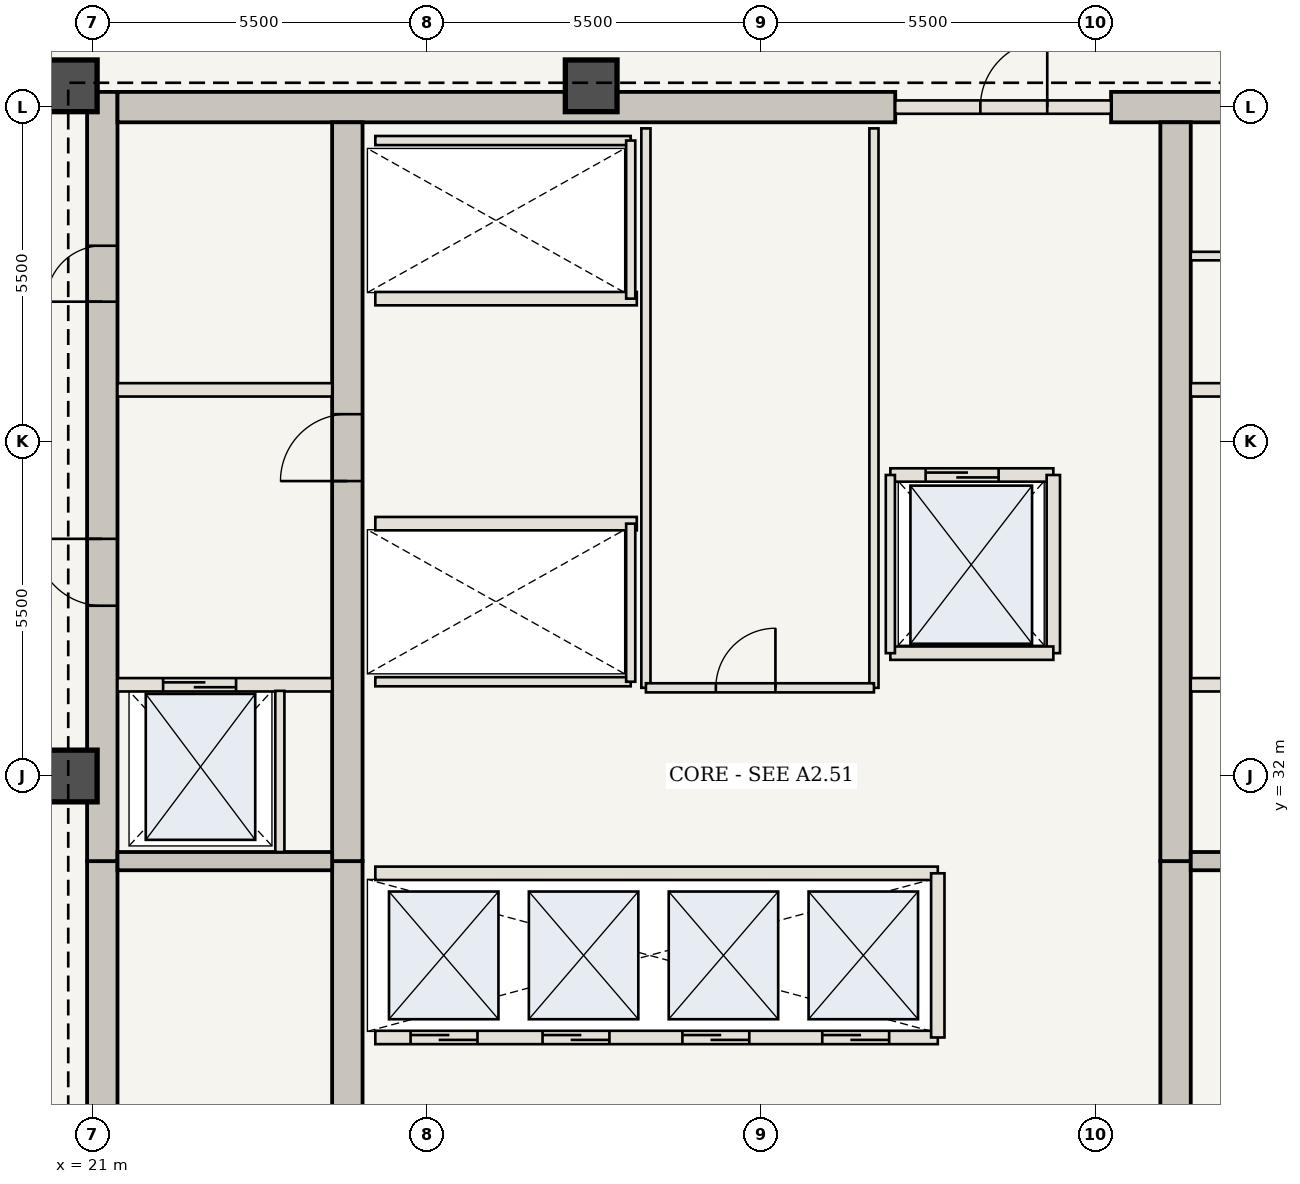
"""IFC4 building model, lengths in metres.
Left out: names, types, materials, properties, quantities, classifications, styles, units other than length and angle.
Written with IfcOpenShell. Run it as: python <this file> out.ifc"""

import sys

from ifc_helpers import new_model, si_unit, direction, frame, frame_2d, origin, origin_2d, place, context, subcontext, project, spatial, rectangle, extrude, element, fill, save


model = new_model("IFC4")
c1 = context("Model", 3, precision=1e-05, world=origin(), true_north=direction((0.0, 1.0)))
c2 = subcontext(c1, "Body", "Model", "MODEL_VIEW")
j1 = project(units=[si_unit("LENGTHUNIT", "METRE"), si_unit("PLANEANGLEUNIT", "RADIAN")], contexts=[c1])
p1 = place(None, origin())
s1 = spatial("IfcSite", under=j1, at=p1, CompositionType="ELEMENT")
p2 = place(p1, origin())
s2 = spatial("IfcBuilding", under=s1, at=p2, CompositionType="ELEMENT")
p3 = place(p2, frame((0.0, 0.0, 233.1)))
s3 = spatial("IfcBuildingStorey", under=s2, at=p3, CompositionType="ELEMENT", Elevation=233.1)
p4 = place(p3, frame((21.16, 20.7, 0.0), z_axis=(0.0, 0.0, 1.0), x_axis=(0.0, 1.0, 0.0)))
e1 = element("IfcWall", 1, at=p4, inside=s3, PredefinedType="SHEAR", context=c2, shape_type="SweptSolid", body=[
    extrude(rectangle(XDim=9.9, YDim=0.5, at=frame_2d((4.95, 0.0))), origin(), (0.0, 0.0, 1.0), 3.85),
])
p5 = place(p4, frame((1.05, 0.0, 0.0)))
e2 = element("IfcOpeningElement", 2, at=p5, cuts=e1, PredefinedType="OPENING", context=c2, shape_type="SweptSolid", body=[
    extrude(rectangle(XDim=1.15, YDim=2.15, at=frame_2d((0.575, 1.075))), frame((0.0, 0.26, 0.0), z_axis=(0.0, -1.0, 0.0), x_axis=(1.0, 0.0, 0.0)), (0.0, 0.0, 1.0), 0.52),
])
p6 = place(p3, frame((21.16, 30.6, 0.0), z_axis=(0.0, 0.0, 1.0), x_axis=(0.0, 1.0, 0.0)))
e3 = element("IfcWall", 3, at=p6, inside=s3, PredefinedType="SHEAR", context=c2, shape_type="SweptSolid", body=[
    extrude(rectangle(XDim=12.65, YDim=0.5, at=frame_2d((6.325, 0.0))), origin(), (0.0, 0.0, 1.0), 3.85),
])
p7 = place(p6, frame((4.2, 0.0, 0.0)))
e4 = element("IfcOpeningElement", 4, at=p7, cuts=e3, PredefinedType="OPENING", context=c2, shape_type="SweptSolid", body=[
    extrude(rectangle(XDim=1.1, YDim=2.15, at=frame_2d((0.55, 1.075))), frame((0.0, 0.26, 0.0), z_axis=(0.0, -1.0, 0.0), x_axis=(1.0, 0.0, 0.0)), (0.0, 0.0, 1.0), 0.52),
])
p8 = place(p6, frame((9.2, 0.0, 0.0)))
e5 = element("IfcOpeningElement", 5, at=p8, cuts=e3, PredefinedType="OPENING", context=c2, shape_type="SweptSolid", body=[
    extrude(rectangle(XDim=0.92, YDim=2.1, at=frame_2d((0.46, 1.05))), frame((0.0, 0.26, 0.0), z_axis=(0.0, -1.0, 0.0), x_axis=(1.0, 0.0, 0.0)), (0.0, 0.0, 1.0), 0.52),
])
p9 = place(p3, frame((21.41, 43.0, 0.0), z_axis=(0.0, 0.0, 1.0), x_axis=(1.0, 0.0, 0.0)))
e6 = element("IfcWall", 6, at=p9, inside=s3, PredefinedType="SHEAR", context=c2, shape_type="SweptSolid", body=[
    extrude(rectangle(XDim=12.79, YDim=0.5, at=frame_2d((6.395, 0.0))), origin(), (0.0, 0.0, 1.0), 3.85),
])
p10 = place(p3, frame((37.75, 43.0, 0.0), z_axis=(0.0, 0.0, 1.0), x_axis=(1.0, 0.0, 0.0)))
e7 = element("IfcWall", 7, at=p10, inside=s3, PredefinedType="SHEAR", context=c2, shape_type="SweptSolid", body=[
    extrude(rectangle(XDim=4.84, YDim=0.5, at=frame_2d((2.42, 0.0))), origin(), (0.0, 0.0, 1.0), 3.85),
])
p11 = place(p3, frame((25.19, 21.2, 0.0), z_axis=(0.0, 0.0, 1.0), x_axis=(0.0, 1.0, 0.0)))
e8 = element("IfcWall", 8, at=p11, inside=s3, PredefinedType="SHEAR", context=c2, shape_type="SweptSolid", body=[
    extrude(rectangle(XDim=9.4, YDim=0.5, at=frame_2d((4.7, 0.0))), origin(), (0.0, 0.0, 1.0), 3.85),
])
p12 = place(p3, frame((25.19, 30.6, 0.0), z_axis=(0.0, 0.0, 1.0), x_axis=(0.0, 1.0, 0.0)))
e9 = element("IfcWall", 9, at=p12, inside=s3, PredefinedType="SHEAR", context=c2, shape_type="SweptSolid", body=[
    extrude(rectangle(XDim=12.15, YDim=0.5, at=frame_2d((6.075, 0.0))), origin(), (0.0, 0.0, 1.0), 3.85),
])
p13 = place(p12, frame((6.25, 0.0, 0.0)))
e10 = element("IfcOpeningElement", 10, at=p13, cuts=e9, PredefinedType="OPENING", context=c2, shape_type="SweptSolid", body=[
    extrude(rectangle(XDim=1.1, YDim=2.15, at=frame_2d((0.55, 1.075))), frame((0.0, 0.26, 0.0), z_axis=(0.0, -1.0, 0.0), x_axis=(1.0, 0.0, 0.0)), (0.0, 0.0, 1.0), 0.52),
])
p14 = place(p3, frame((38.81, 21.2, 0.0), z_axis=(0.0, 0.0, 1.0), x_axis=(0.0, 1.0, 0.0)))
e11 = element("IfcWall", 11, at=p14, inside=s3, PredefinedType="SHEAR", context=c2, shape_type="SweptSolid", body=[
    extrude(rectangle(XDim=9.4, YDim=0.5, at=frame_2d((4.7, 0.0))), origin(), (0.0, 0.0, 1.0), 3.85),
])
p15 = place(p3, frame((38.81, 30.6, 0.0), z_axis=(0.0, 0.0, 1.0), x_axis=(0.0, 1.0, 0.0)))
e12 = element("IfcWall", 12, at=p15, inside=s3, PredefinedType="SHEAR", context=c2, shape_type="SweptSolid", body=[
    extrude(rectangle(XDim=12.15, YDim=0.5, at=frame_2d((6.075, 0.0))), origin(), (0.0, 0.0, 1.0), 3.85),
])
for number, where, z_axis, x_axis in (
    (13, (29.2, 43.35, 0.0), (0.0, 0.0, 1.0), (1.0, 0.0, 0.0)),
    (14, (20.65, 43.35, 0.0), (0.0, 0.0, 1.0), (1.0, 0.0, 0.0)),
    (15, (20.65, 32.0, 0.0), (0.0, 0.0, 1.0), (1.0, 0.0, 0.0)),
):
    element("IfcColumn", number, at=place(p3, frame(where, z_axis=z_axis, x_axis=x_axis)), inside=s3, PredefinedType="COLUMN", context=c2, shape_type="SweptSolid", body=[
        extrude(rectangle(XDim=0.85, YDim=0.85, at=origin_2d()), origin(), (0.0, 0.0, 1.0), 3.85),
    ])
for number, where, z_axis, x_axis in (
    (16, (21.41, 30.6, 0.0), (0.0, 0.0, 1.0), (1.0, 0.0, 0.0)),
    (17, (39.06, 30.6, 0.0), (0.0, 0.0, 1.0), (1.0, 0.0, 0.0)),
):
    element("IfcWall", number, at=place(p3, frame(where, z_axis=z_axis, x_axis=x_axis)), inside=s3, PredefinedType="SHEAR", context=c2, shape_type="SweptSolid", body=[
        extrude(rectangle(XDim=3.53, YDim=0.3, at=frame_2d((1.765, 0.0))), origin(), (0.0, 0.0, 1.0), 3.685),
    ])
p16 = place(p3, frame((21.41, 33.5, 0.0), z_axis=(0.0, 0.0, 1.0), x_axis=(1.0, 0.0, 0.0)))
e18 = element("IfcWall", 18, at=p16, inside=s3, PredefinedType="STANDARD", context=c2, shape_type="SweptSolid", body=[
    extrude(rectangle(XDim=3.53, YDim=0.22, at=frame_2d((1.765, 0.0))), origin(), (0.0, 0.0, 1.0), 3.685),
])
p17 = place(p16, frame((0.75, 0.0, 0.0)))
e19 = element("IfcOpeningElement", 19, at=p17, cuts=e18, PredefinedType="OPENING", context=c2, shape_type="SweptSolid", body=[
    extrude(rectangle(XDim=1.2, YDim=2.2, at=frame_2d((0.6, 1.1))), frame((0.0, 0.12, 0.0), z_axis=(0.0, -1.0, 0.0), x_axis=(1.0, 0.0, 0.0)), (0.0, 0.0, 1.0), 0.24),
])
p18 = place(p3, frame((24.08, 30.75, 0.0), z_axis=(0.0, 0.0, 1.0), x_axis=(0.0, 1.0, 0.0)))
e20 = element("IfcWall", 20, at=p18, inside=s3, PredefinedType="STANDARD", context=c2, shape_type="SweptSolid", body=[
    extrude(rectangle(XDim=2.65, YDim=0.15, at=frame_2d((1.325, 0.0))), origin(), (0.0, 0.0, 1.0), 3.685),
])
p19 = place(p3, frame((39.06, 33.5, 0.0), z_axis=(0.0, 0.0, 1.0), x_axis=(1.0, 0.0, 0.0)))
e21 = element("IfcWall", 21, at=p19, inside=s3, PredefinedType="STANDARD", context=c2, shape_type="SweptSolid", body=[
    extrude(rectangle(XDim=3.53, YDim=0.22, at=frame_2d((1.765, 0.0))), origin(), (0.0, 0.0, 1.0), 3.685),
])
p20 = place(p19, frame((1.55, 0.0, 0.0)))
e22 = element("IfcOpeningElement", 22, at=p20, cuts=e21, PredefinedType="OPENING", context=c2, shape_type="SweptSolid", body=[
    extrude(rectangle(XDim=1.2, YDim=2.2, at=frame_2d((0.6, 1.1))), frame((0.0, 0.12, 0.0), z_axis=(0.0, -1.0, 0.0), x_axis=(1.0, 0.0, 0.0)), (0.0, 0.0, 1.0), 0.24),
])
for number, where, z_axis, x_axis in (
    (23, (21.41, 38.35, 0.0), (0.0, 0.0, 1.0), (1.0, 0.0, 0.0)),
    (24, (39.06, 38.35, 0.0), (0.0, 0.0, 1.0), (1.0, 0.0, 0.0)),
):
    element("IfcWall", number, at=place(p3, frame(where, z_axis=z_axis, x_axis=x_axis)), inside=s3, PredefinedType="STANDARD", context=c2, shape_type="SweptSolid", body=[
        extrude(rectangle(XDim=3.53, YDim=0.22, at=frame_2d((1.765, 0.0))), origin(), (0.0, 0.0, 1.0), 3.685),
    ])
p21 = place(p3, frame((39.06, 40.55, 0.0), z_axis=(0.0, 0.0, 1.0), x_axis=(1.0, 0.0, 0.0)))
e25 = element("IfcWall", 25, at=p21, inside=s3, PredefinedType="STANDARD", context=c2, shape_type="SweptSolid", body=[
    extrude(rectangle(XDim=3.53, YDim=0.14, at=frame_2d((1.765, 0.0))), origin(), (0.0, 0.0, 1.0), 3.685),
])
p22 = place(p3, frame((25.65, 27.7, 0.0), z_axis=(0.0, 0.0, 1.0), x_axis=(1.0, 0.0, 0.0)))
e26 = element("IfcWall", 26, at=p22, inside=s3, PredefinedType="STANDARD", context=c2, shape_type="SweptSolid", body=[
    extrude(rectangle(XDim=9.25, YDim=0.22, at=frame_2d((4.625, 0.0))), origin(), (0.0, 0.0, 1.0), 3.685),
])
p23 = place(p22, frame((0.58, 0.0, 0.0)))
e27 = element("IfcOpeningElement", 27, at=p23, cuts=e26, PredefinedType="OPENING", context=c2, shape_type="SweptSolid", body=[
    extrude(rectangle(XDim=1.1, YDim=2.15, at=frame_2d((0.55, 1.075))), frame((0.0, 0.12, 0.0), z_axis=(0.0, -1.0, 0.0), x_axis=(1.0, 0.0, 0.0)), (0.0, 0.0, 1.0), 0.24),
])
p24 = place(p22, frame((2.75, 0.0, 0.0)))
e28 = element("IfcOpeningElement", 28, at=p24, cuts=e26, PredefinedType="OPENING", context=c2, shape_type="SweptSolid", body=[
    extrude(rectangle(XDim=1.1, YDim=2.15, at=frame_2d((0.55, 1.075))), frame((0.0, 0.12, 0.0), z_axis=(0.0, -1.0, 0.0), x_axis=(1.0, 0.0, 0.0)), (0.0, 0.0, 1.0), 0.24),
])
p25 = place(p22, frame((5.05, 0.0, 0.0)))
e29 = element("IfcOpeningElement", 29, at=p25, cuts=e26, PredefinedType="OPENING", context=c2, shape_type="SweptSolid", body=[
    extrude(rectangle(XDim=1.1, YDim=2.15, at=frame_2d((0.55, 1.075))), frame((0.0, 0.12, 0.0), z_axis=(0.0, -1.0, 0.0), x_axis=(1.0, 0.0, 0.0)), (0.0, 0.0, 1.0), 0.24),
])
p26 = place(p22, frame((7.35, 0.0, 0.0)))
e30 = element("IfcOpeningElement", 30, at=p26, cuts=e26, PredefinedType="OPENING", context=c2, shape_type="SweptSolid", body=[
    extrude(rectangle(XDim=1.1, YDim=2.15, at=frame_2d((0.55, 1.075))), frame((0.0, 0.12, 0.0), z_axis=(0.0, -1.0, 0.0), x_axis=(1.0, 0.0, 0.0)), (0.0, 0.0, 1.0), 0.24),
])
p27 = place(p3, frame((25.65, 30.4, 0.0), z_axis=(0.0, 0.0, 1.0), x_axis=(1.0, 0.0, 0.0)))
e31 = element("IfcWall", 31, at=p27, inside=s3, PredefinedType="STANDARD", context=c2, shape_type="SweptSolid", body=[
    extrude(rectangle(XDim=9.25, YDim=0.22, at=frame_2d((4.625, 0.0))), origin(), (0.0, 0.0, 1.0), 3.685),
])
p28 = place(p3, frame((34.9, 27.7, 0.0), z_axis=(0.0, 0.0, 1.0), x_axis=(0.0, 1.0, 0.0)))
e32 = element("IfcWall", 32, at=p28, inside=s3, PredefinedType="STANDARD", context=c2, shape_type="SweptSolid", body=[
    extrude(rectangle(XDim=2.7, YDim=0.22, at=frame_2d((1.35, 0.0))), origin(), (0.0, 0.0, 1.0), 3.685),
])
p29 = place(p3, frame((25.65, 36.15, 0.0), z_axis=(0.0, 0.0, 1.0), x_axis=(1.0, 0.0, 0.0)))
e33 = element("IfcWall", 33, at=p29, inside=s3, PredefinedType="STANDARD", context=c2, shape_type="SweptSolid", body=[
    extrude(rectangle(XDim=4.3, YDim=0.22, at=frame_2d((2.15, 0.0))), origin(), (0.0, 0.0, 1.0), 3.685),
])
p30 = place(p3, frame((25.65, 33.55, 0.0), z_axis=(0.0, 0.0, 1.0), x_axis=(1.0, 0.0, 0.0)))
e34 = element("IfcWall", 34, at=p30, inside=s3, PredefinedType="STANDARD", context=c2, shape_type="SweptSolid", body=[
    extrude(rectangle(XDim=4.2, YDim=0.15, at=frame_2d((2.1, 0.0))), origin(), (0.0, 0.0, 1.0), 3.685),
])
p31 = place(p3, frame((29.85, 33.55, 0.0), z_axis=(0.0, 0.0, 1.0), x_axis=(0.0, 1.0, 0.0)))
e35 = element("IfcWall", 35, at=p31, inside=s3, PredefinedType="STANDARD", context=c2, shape_type="SweptSolid", body=[
    extrude(rectangle(XDim=2.6, YDim=0.15, at=frame_2d((1.3, 0.0))), origin(), (0.0, 0.0, 1.0), 3.685),
])
p32 = place(p3, frame((25.65, 39.85, 0.0), z_axis=(0.0, 0.0, 1.0), x_axis=(1.0, 0.0, 0.0)))
e36 = element("IfcWall", 36, at=p32, inside=s3, PredefinedType="STANDARD", context=c2, shape_type="SweptSolid", body=[
    extrude(rectangle(XDim=4.3, YDim=0.22, at=frame_2d((2.15, 0.0))), origin(), (0.0, 0.0, 1.0), 3.685),
])
p33 = place(p3, frame((25.65, 42.45, 0.0), z_axis=(0.0, 0.0, 1.0), x_axis=(1.0, 0.0, 0.0)))
e37 = element("IfcWall", 37, at=p33, inside=s3, PredefinedType="STANDARD", context=c2, shape_type="SweptSolid", body=[
    extrude(rectangle(XDim=4.2, YDim=0.15, at=frame_2d((2.1, 0.0))), origin(), (0.0, 0.0, 1.0), 3.685),
])
p34 = place(p3, frame((29.85, 39.85, 0.0), z_axis=(0.0, 0.0, 1.0), x_axis=(0.0, 1.0, 0.0)))
e38 = element("IfcWall", 38, at=p34, inside=s3, PredefinedType="STANDARD", context=c2, shape_type="SweptSolid", body=[
    extrude(rectangle(XDim=2.6, YDim=0.15, at=frame_2d((1.3, 0.0))), origin(), (0.0, 0.0, 1.0), 3.685),
])
for number, where, z_axis, x_axis in (
    (39, (30.1, 33.45, 0.0), (0.0, 0.0, 1.0), (0.0, 1.0, 0.0)),
    (40, (33.85, 33.45, 0.0), (0.0, 0.0, 1.0), (0.0, 1.0, 0.0)),
):
    element("IfcWall", number, at=place(p3, frame(where, z_axis=z_axis, x_axis=x_axis)), inside=s3, PredefinedType="STANDARD", context=c2, shape_type="SweptSolid", body=[
        extrude(rectangle(XDim=9.2, YDim=0.15, at=frame_2d((4.6, 0.0))), origin(), (0.0, 0.0, 1.0), 3.685),
    ])
p35 = place(p3, frame((30.1, 33.45, 0.0), z_axis=(0.0, 0.0, 1.0), x_axis=(1.0, 0.0, 0.0)))
e41 = element("IfcWall", 41, at=p35, inside=s3, PredefinedType="STANDARD", context=c2, shape_type="SweptSolid", body=[
    extrude(rectangle(XDim=3.75, YDim=0.15, at=frame_2d((1.875, 0.0))), origin(), (0.0, 0.0, 1.0), 3.685),
])
p36 = place(p35, frame((1.15, 0.0, 0.0)))
e42 = element("IfcOpeningElement", 42, at=p36, cuts=e41, PredefinedType="OPENING", context=c2, shape_type="SweptSolid", body=[
    extrude(rectangle(XDim=0.98, YDim=2.2, at=frame_2d((0.49, 1.1))), frame((0.0, 0.085, 0.0), z_axis=(0.0, -1.0, 0.0), x_axis=(1.0, 0.0, 0.0)), (0.0, 0.0, 1.0), 0.17),
])
p37 = place(p3, frame((34.2, 43.0, 0.0), z_axis=(0.0, 0.0, 1.0), x_axis=(1.0, 0.0, 0.0)))
e43 = element("IfcWall", 43, at=p37, inside=s3, PredefinedType="STANDARD", context=c2, shape_type="SweptSolid", body=[
    extrude(rectangle(XDim=3.55, YDim=0.22, at=frame_2d((1.775, 0.0))), origin(), (0.0, 0.0, 1.0), 3.685),
])
p38 = place(p37, frame((1.4, 0.0, 0.0)))
e44 = element("IfcOpeningElement", 44, at=p38, cuts=e43, PredefinedType="OPENING", context=c2, shape_type="SweptSolid", body=[
    extrude(rectangle(XDim=1.1, YDim=2.15, at=frame_2d((0.55, 1.075))), frame((0.0, 0.12, 0.0), z_axis=(0.0, -1.0, 0.0), x_axis=(1.0, 0.0, 0.0)), (0.0, 0.0, 1.0), 0.24),
])
p39 = place(p3, frame((34.12, 36.95, 0.0), z_axis=(0.0, 0.0, 1.0), x_axis=(1.0, 0.0, 0.0)))
e45 = element("IfcWall", 45, at=p39, inside=s3, PredefinedType="STANDARD", context=c2, shape_type="SweptSolid", body=[
    extrude(rectangle(XDim=2.68, YDim=0.22, at=frame_2d((1.34, 0.0))), origin(), (0.0, 0.0, 1.0), 3.685),
])
p40 = place(p39, frame((0.58, 0.0, 0.0)))
e46 = element("IfcOpeningElement", 46, at=p40, cuts=e45, PredefinedType="OPENING", context=c2, shape_type="SweptSolid", body=[
    extrude(rectangle(XDim=1.2, YDim=2.2, at=frame_2d((0.6, 1.1))), frame((0.0, 0.12, 0.0), z_axis=(0.0, -1.0, 0.0), x_axis=(1.0, 0.0, 0.0)), (0.0, 0.0, 1.0), 0.24),
])
p41 = place(p3, frame((36.8, 34.02, 0.0), z_axis=(0.0, 0.0, 1.0), x_axis=(0.0, 1.0, 0.0)))
e47 = element("IfcWall", 47, at=p41, inside=s3, PredefinedType="STANDARD", context=c2, shape_type="SweptSolid", body=[
    extrude(rectangle(XDim=2.93, YDim=0.22, at=frame_2d((1.465, 0.0))), origin(), (0.0, 0.0, 1.0), 3.685),
])
p42 = place(p3, frame((34.12, 34.02, 0.0), z_axis=(0.0, 0.0, 1.0), x_axis=(1.0, 0.0, 0.0)))
e48 = element("IfcWall", 48, at=p42, inside=s3, PredefinedType="STANDARD", context=c2, shape_type="SweptSolid", body=[
    extrude(rectangle(XDim=2.68, YDim=0.22, at=frame_2d((1.34, 0.0))), origin(), (0.0, 0.0, 1.0), 3.685),
])
p43 = place(p3, frame((34.12, 34.02, 0.0), z_axis=(0.0, 0.0, 1.0), x_axis=(0.0, 1.0, 0.0)))
e49 = element("IfcWall", 49, at=p43, inside=s3, PredefinedType="STANDARD", context=c2, shape_type="SweptSolid", body=[
    extrude(rectangle(XDim=2.93, YDim=0.15, at=frame_2d((1.465, 0.0))), origin(), (0.0, 0.0, 1.0), 3.685),
])
p44 = place(p7, origin())
e50 = element("IfcDoor", 50, at=p44, inside=s3, OperationType="SINGLE_SWING_RIGHT", PredefinedType="DOOR", context=c2, shape_type="SweptSolid", body=[
    extrude(rectangle(XDim=1.1, YDim=2.15, at=frame_2d((0.55, 1.075))), frame((0.0, 0.025, 0.0), z_axis=(0.0, -1.0, 0.0), x_axis=(1.0, 0.0, 0.0)), (0.0, 0.0, 1.0), 0.05),
])
fill(e4, e50)
p45 = place(p13, origin())
e51 = element("IfcDoor", 51, at=p45, inside=s3, OperationType="SINGLE_SWING_LEFT", PredefinedType="DOOR", context=c2, shape_type="SweptSolid", body=[
    extrude(rectangle(XDim=1.1, YDim=2.15, at=frame_2d((0.55, 1.075))), frame((0.0, 0.025, 0.0), z_axis=(0.0, -1.0, 0.0), x_axis=(1.0, 0.0, 0.0)), (0.0, 0.0, 1.0), 0.05),
])
fill(e10, e51)
p46 = place(p8, origin())
e52 = element("IfcDoor", 52, at=p46, inside=s3, OperationType="SINGLE_SWING_LEFT", PredefinedType="DOOR", context=c2, shape_type="SweptSolid", body=[
    extrude(rectangle(XDim=0.92, YDim=2.1, at=frame_2d((0.46, 1.05))), frame((0.0, 0.025, 0.0), z_axis=(0.0, -1.0, 0.0), x_axis=(1.0, 0.0, 0.0)), (0.0, 0.0, 1.0), 0.05),
])
fill(e5, e52)
p47 = place(p17, origin())
e53 = element("IfcDoor", 53, at=p47, inside=s3, OperationType="DOUBLE_DOOR_SLIDING", PredefinedType="DOOR", context=c2, shape_type="SweptSolid", body=[
    extrude(rectangle(XDim=1.2, YDim=2.2, at=frame_2d((0.6, 1.1))), frame((0.0, 0.025, 0.0), z_axis=(0.0, -1.0, 0.0), x_axis=(1.0, 0.0, 0.0)), (0.0, 0.0, 1.0), 0.05),
])
fill(e19, e53)
p48 = place(p23, origin())
e54 = element("IfcDoor", 54, at=p48, inside=s3, OperationType="DOUBLE_DOOR_SLIDING", PredefinedType="DOOR", context=c2, shape_type="SweptSolid", body=[
    extrude(rectangle(XDim=1.1, YDim=2.15, at=frame_2d((0.55, 1.075))), frame((0.0, 0.025, 0.0), z_axis=(0.0, -1.0, 0.0), x_axis=(1.0, 0.0, 0.0)), (0.0, 0.0, 1.0), 0.05),
])
fill(e27, e54)
p49 = place(p24, origin())
e55 = element("IfcDoor", 55, at=p49, inside=s3, OperationType="DOUBLE_DOOR_SLIDING", PredefinedType="DOOR", context=c2, shape_type="SweptSolid", body=[
    extrude(rectangle(XDim=1.1, YDim=2.15, at=frame_2d((0.55, 1.075))), frame((0.0, 0.025, 0.0), z_axis=(0.0, -1.0, 0.0), x_axis=(1.0, 0.0, 0.0)), (0.0, 0.0, 1.0), 0.05),
])
fill(e28, e55)
p50 = place(p25, origin())
e56 = element("IfcDoor", 56, at=p50, inside=s3, OperationType="DOUBLE_DOOR_SLIDING", PredefinedType="DOOR", context=c2, shape_type="SweptSolid", body=[
    extrude(rectangle(XDim=1.1, YDim=2.15, at=frame_2d((0.55, 1.075))), frame((0.0, 0.025, 0.0), z_axis=(0.0, -1.0, 0.0), x_axis=(1.0, 0.0, 0.0)), (0.0, 0.0, 1.0), 0.05),
])
fill(e29, e56)
p51 = place(p26, origin())
e57 = element("IfcDoor", 57, at=p51, inside=s3, OperationType="DOUBLE_DOOR_SLIDING", PredefinedType="DOOR", context=c2, shape_type="SweptSolid", body=[
    extrude(rectangle(XDim=1.1, YDim=2.15, at=frame_2d((0.55, 1.075))), frame((0.0, 0.025, 0.0), z_axis=(0.0, -1.0, 0.0), x_axis=(1.0, 0.0, 0.0)), (0.0, 0.0, 1.0), 0.05),
])
fill(e30, e57)
p52 = place(p36, origin())
e58 = element("IfcDoor", 58, at=p52, inside=s3, OperationType="SINGLE_SWING_RIGHT", PredefinedType="DOOR", context=c2, shape_type="SweptSolid", body=[
    extrude(rectangle(XDim=0.98, YDim=2.2, at=frame_2d((0.49, 1.1))), frame((0.0, 0.025, 0.0), z_axis=(0.0, -1.0, 0.0), x_axis=(1.0, 0.0, 0.0)), (0.0, 0.0, 1.0), 0.05),
])
fill(e42, e58)
p53 = place(p38, origin())
e59 = element("IfcDoor", 59, at=p53, inside=s3, OperationType="SINGLE_SWING_RIGHT", PredefinedType="DOOR", context=c2, shape_type="SweptSolid", body=[
    extrude(rectangle(XDim=1.1, YDim=2.15, at=frame_2d((0.55, 1.075))), frame((0.0, 0.025, 0.0), z_axis=(0.0, -1.0, 0.0), x_axis=(1.0, 0.0, 0.0)), (0.0, 0.0, 1.0), 0.05),
])
fill(e44, e59)
p54 = place(p40, origin())
e60 = element("IfcDoor", 60, at=p54, inside=s3, OperationType="DOUBLE_DOOR_SLIDING", PredefinedType="DOOR", context=c2, shape_type="SweptSolid", body=[
    extrude(rectangle(XDim=1.2, YDim=2.2, at=frame_2d((0.6, 1.1))), frame((0.0, 0.025, 0.0), z_axis=(0.0, -1.0, 0.0), x_axis=(1.0, 0.0, 0.0)), (0.0, 0.0, 1.0), 0.05),
])
fill(e46, e60)
save(model, sys.argv[1])
